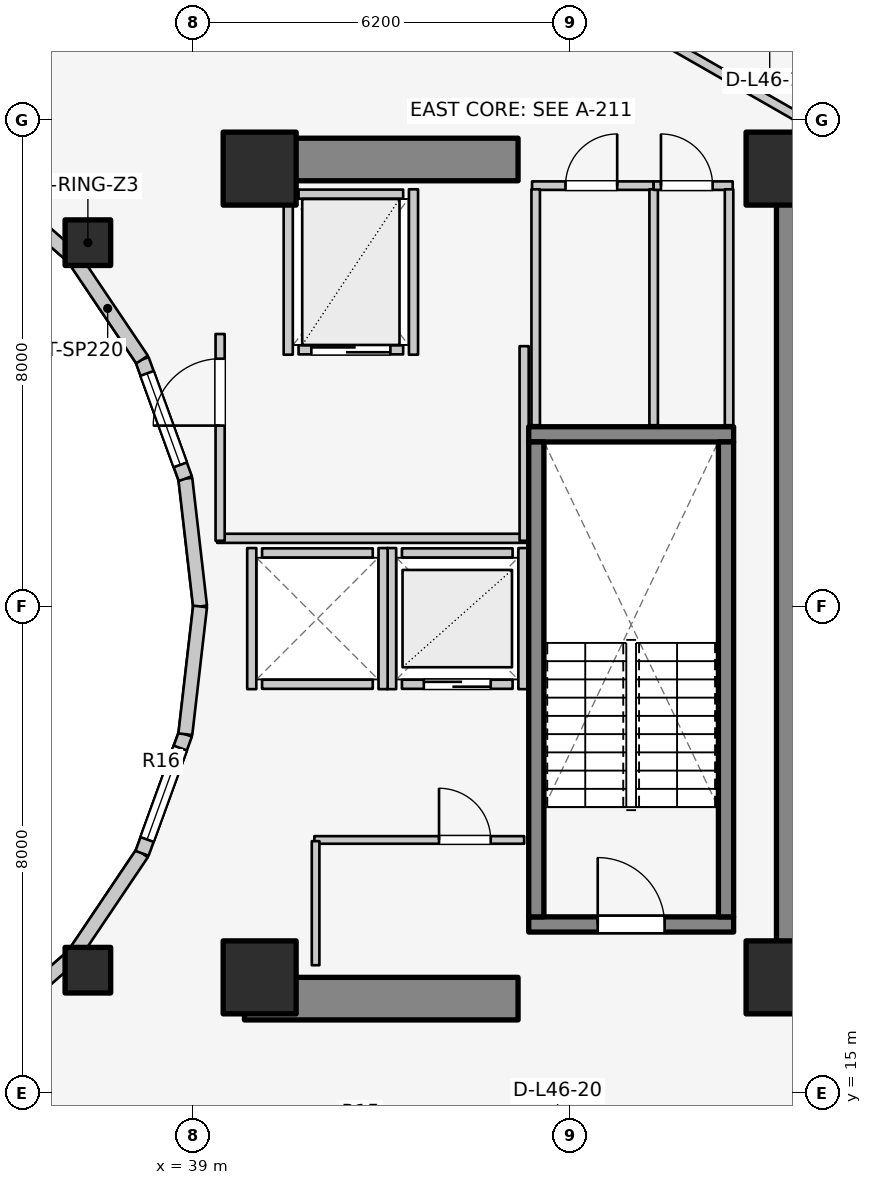
"""IFC4 building model, lengths in metres.
Left out: names, types, materials, properties, quantities, classifications, styles, units other than length and angle.
Written with IfcOpenShell. Run it as: python <this file> out.ifc"""

import sys

from ifc_helpers import new_model, si_unit, direction, frame, frame_2d, origin, origin_2d, place, context, subcontext, project, spatial, rectangle, extrude, element, fill, save


model = new_model("IFC4")
c1 = context("Model", 3, precision=1e-05, world=origin(), true_north=direction((0.0, 1.0)))
c2 = subcontext(c1, "Body", "Model", "MODEL_VIEW")
j1 = project(units=[si_unit("LENGTHUNIT", "METRE"), si_unit("PLANEANGLEUNIT", "RADIAN")], contexts=[c1])
p1 = place(None, origin())
s1 = spatial("IfcSite", under=j1, at=p1, CompositionType="ELEMENT")
p2 = place(p1, origin())
s2 = spatial("IfcBuilding", under=s1, at=p2, CompositionType="ELEMENT")
p3 = place(p2, frame((0.0, 0.0, 152.9)))
s3 = spatial("IfcBuildingStorey", under=s2, at=p3, CompositionType="ELEMENT", Elevation=152.9)
p4 = place(p3, frame((48.95, 17.05, 0.0), z_axis=(0.0, 0.0, 1.0), x_axis=(0.0, 1.0, 0.0)))
e1 = element("IfcWall", 1, at=p4, inside=s3, PredefinedType="SHEAR", context=c2, shape_type="SweptSolid", body=[
    extrude(rectangle(XDim=12.8, YDim=0.7, at=frame_2d((6.4, 0.0))), origin(), (0.0, 0.0, 1.0), 3.1),
])
for number, where, z_axis, x_axis in (
    (2, (39.85, 16.55, 0.0), (0.0, 0.0, 1.0), (1.0, 0.0, 0.0)),
    (3, (39.85, 30.35, 0.0), (0.0, 0.0, 1.0), (1.0, 0.0, 0.0)),
):
    element("IfcWall", number, at=place(p3, frame(where, z_axis=z_axis, x_axis=x_axis)), inside=s3, PredefinedType="SHEAR", context=c2, shape_type="SweptSolid", body=[
        extrude(rectangle(XDim=4.5, YDim=0.7, at=frame_2d((2.25, 0.0))), origin(), (0.0, 0.0, 1.0), 3.1),
    ])
p5 = place(p3, frame((44.525, 17.77, 0.0), z_axis=(0.0, 0.0, 1.0), x_axis=(1.0, 0.0, 0.0)))
e4 = element("IfcWall", 4, at=p5, inside=s3, PredefinedType="SOLIDWALL", context=c2, shape_type="SweptSolid", body=[
    extrude(rectangle(XDim=3.37, YDim=0.25, at=frame_2d((1.685, 0.0))), origin(), (0.0, 0.0, 1.0), 3.1),
])
p6 = place(p5, frame((1.135, 0.0, 0.0)))
e5 = element("IfcOpeningElement", 5, at=p6, cuts=e4, PredefinedType="OPENING", context=c2, shape_type="SweptSolid", body=[
    extrude(rectangle(XDim=1.1, YDim=2.1, at=frame_2d((0.55, 1.05))), frame((0.0, 0.135, 0.0), z_axis=(0.0, -1.0, 0.0), x_axis=(1.0, 0.0, 0.0)), (0.0, 0.0, 1.0), 0.27),
])
p7 = place(p3, frame((44.525, 25.83, 0.0), z_axis=(0.0, 0.0, 1.0), x_axis=(1.0, 0.0, 0.0)))
e6 = element("IfcWall", 6, at=p7, inside=s3, PredefinedType="SOLIDWALL", context=c2, shape_type="SweptSolid", body=[
    extrude(rectangle(XDim=3.37, YDim=0.25, at=frame_2d((1.685, 0.0))), origin(), (0.0, 0.0, 1.0), 3.1),
])
for number, where, z_axis, x_axis in (
    (7, (44.65, 17.895, 0.0), (0.0, 0.0, 1.0), (0.0, 1.0, 0.0)),
    (8, (47.77, 17.895, 0.0), (0.0, 0.0, 1.0), (0.0, 1.0, 0.0)),
):
    element("IfcWall", number, at=place(p3, frame(where, z_axis=z_axis, x_axis=x_axis)), inside=s3, PredefinedType="SOLIDWALL", context=c2, shape_type="SweptSolid", body=[
        extrude(rectangle(XDim=7.81, YDim=0.25, at=frame_2d((3.905, 0.0))), origin(), (0.0, 0.0, 1.0), 3.1),
    ])
for number, where, z_axis, x_axis in (
    (9, (40.1, 16.9, 0.0), (0.0, 0.0, 1.0), (1.0, 0.0, 0.0)),
    (10, (48.7, 16.9, 0.0), (0.0, 0.0, 1.0), (1.0, 0.0, 0.0)),
    (11, (48.7, 30.2, 0.0), (0.0, 0.0, 1.0), (1.0, 0.0, 0.0)),
    (12, (40.1, 30.2, 0.0), (0.0, 0.0, 1.0), (1.0, 0.0, 0.0)),
):
    element("IfcColumn", number, at=place(p3, frame(where, z_axis=z_axis, x_axis=x_axis)), inside=s3, PredefinedType="COLUMN", context=c2, shape_type="SweptSolid", body=[
        extrude(rectangle(XDim=1.2, YDim=1.2, at=origin_2d()), origin(), (0.0, 0.0, 1.0), 3.1),
    ])
for number, where, z_axis, x_axis in (
    (13, (37.275, 28.982, 0.0), (0.0, 0.0, 1.0), (1.0, 0.0, 0.0)),
    (14, (37.275, 17.018, 0.0), (0.0, 0.0, 1.0), (1.0, 0.0, 0.0)),
):
    element("IfcColumn", number, at=place(p3, frame(where, z_axis=z_axis, x_axis=x_axis)), inside=s3, PredefinedType="COLUMN", context=c2, shape_type="SweptSolid", body=[
        extrude(rectangle(XDim=0.75, YDim=0.75, at=origin_2d()), origin(), (0.0, 0.0, 1.0), 3.1),
    ])
p8 = place(p3, frame((39.12, 23.0, 0.0), z_axis=(0.0, 0.0, 1.0), x_axis=(-0.114711713601, 0.993398823617, 0.0)))
e15 = element("IfcWall", 15, at=p8, inside=s3, PredefinedType="STANDARD", context=c2, shape_type="SweptSolid", body=[
    extrude(rectangle(XDim=2.115, YDim=0.23, at=frame_2d((1.058, 0.0))), origin(), (0.0, 0.0, 1.0), 2.84),
])
p9 = place(p3, frame((38.877, 25.102, 0.0), z_axis=(0.0, 0.0, 1.0), x_axis=(-0.341423187295, 0.93990968033, 0.0)))
e16 = element("IfcWall", 16, at=p9, inside=s3, PredefinedType="STANDARD", context=c2, shape_type="SweptSolid", body=[
    extrude(rectangle(XDim=2.084, YDim=0.23, at=frame_2d((1.042, 0.0))), origin(), (0.0, 0.0, 1.0), 2.84),
])
p10 = place(p9, frame((0.242, 0.0, 0.85)))
e17 = element("IfcOpeningElement", 17, at=p10, cuts=e16, PredefinedType="OPENING", context=c2, shape_type="SweptSolid", body=[
    extrude(rectangle(XDim=1.6, YDim=1.65, at=frame_2d((0.8, 0.825))), frame((0.0, 0.125, 0.0), z_axis=(0.0, -1.0, 0.0), x_axis=(1.0, 0.0, 0.0)), (0.0, 0.0, 1.0), 0.25),
])
p11 = place(p3, frame((38.166, 27.06, 0.0), z_axis=(0.0, 0.0, 1.0), x_axis=(-0.558197800898, 0.829707909492, 0.0)))
e18 = element("IfcWall", 18, at=p11, inside=s3, PredefinedType="STANDARD", context=c2, shape_type="SweptSolid", body=[
    extrude(rectangle(XDim=2.027, YDim=0.23, at=frame_2d((1.013, 0.0))), origin(), (0.0, 0.0, 1.0), 2.16),
])
for number, where, z_axis, x_axis in (
    (19, (37.035, 28.742, 0.0), (0.0, 0.0, 1.0), (-0.753, 0.659, 0.0)),
    (20, (35.56, 15.968, 0.0), (0.0, 0.0, 1.0), (0.753, 0.659, 0.0)),
):
    element("IfcWall", number, at=place(p3, frame(where, z_axis=z_axis, x_axis=x_axis)), inside=s3, PredefinedType="STANDARD", context=c2, shape_type="SweptSolid", body=[
        extrude(rectangle(XDim=1.959, YDim=0.23, at=frame_2d((0.98, 0.0))), origin(), (0.0, 0.0, 1.0), 2.16),
    ])
p12 = place(p3, frame((37.035, 17.258, 0.0), z_axis=(0.0, 0.0, 1.0), x_axis=(0.558197800898, 0.829707909492, 0.0)))
e21 = element("IfcWall", 21, at=p12, inside=s3, PredefinedType="STANDARD", context=c2, shape_type="SweptSolid", body=[
    extrude(rectangle(XDim=2.027, YDim=0.23, at=frame_2d((1.013, 0.0))), origin(), (0.0, 0.0, 1.0), 2.16),
])
p13 = place(p3, frame((38.166, 18.94, 0.0), z_axis=(0.0, 0.0, 1.0), x_axis=(0.341423187295, 0.93990968033, 0.0)))
e22 = element("IfcWall", 22, at=p13, inside=s3, PredefinedType="STANDARD", context=c2, shape_type="SweptSolid", body=[
    extrude(rectangle(XDim=2.084, YDim=0.23, at=frame_2d((1.042, 0.0))), origin(), (0.0, 0.0, 1.0), 2.84),
])
p14 = place(p13, frame((0.242, 0.0, 0.85)))
e23 = element("IfcOpeningElement", 23, at=p14, cuts=e22, PredefinedType="OPENING", context=c2, shape_type="SweptSolid", body=[
    extrude(rectangle(XDim=1.6, YDim=1.65, at=frame_2d((0.8, 0.825))), frame((0.0, 0.125, 0.0), z_axis=(0.0, -1.0, 0.0), x_axis=(1.0, 0.0, 0.0)), (0.0, 0.0, 1.0), 0.25),
])
p15 = place(p3, frame((38.877, 20.898, 0.0), z_axis=(0.0, 0.0, 1.0), x_axis=(0.114711713601, 0.993398823617, 0.0)))
e24 = element("IfcWall", 24, at=p15, inside=s3, PredefinedType="STANDARD", context=c2, shape_type="SweptSolid", body=[
    extrude(rectangle(XDim=2.115, YDim=0.23, at=frame_2d((1.058, 0.0))), origin(), (0.0, 0.0, 1.0), 2.84),
])
p16 = place(p3, frame((42.44, 21.72, 0.0), z_axis=(0.0, 0.0, 1.0), x_axis=(1.0, 0.0, 0.0)))
e25 = element("IfcWall", 25, at=p16, inside=s3, PredefinedType="SOLIDWALL", context=c2, shape_type="SweptSolid", body=[
    extrude(rectangle(XDim=1.82, YDim=0.15, at=frame_2d((0.91, 0.0))), origin(), (0.0, 0.0, 1.0), 2.855),
])
p17 = place(p16, frame((0.36, 0.0, 0.0)))
e26 = element("IfcOpeningElement", 26, at=p17, cuts=e25, PredefinedType="OPENING", context=c2, shape_type="SweptSolid", body=[
    extrude(rectangle(XDim=1.1, YDim=2.1, at=frame_2d((0.55, 1.05))), frame((0.0, 0.085, 0.0), z_axis=(0.0, -1.0, 0.0), x_axis=(1.0, 0.0, 0.0)), (0.0, 0.0, 1.0), 0.17),
])
p18 = place(p3, frame((42.44, 23.88, 0.0), z_axis=(0.0, 0.0, 1.0), x_axis=(1.0, 0.0, 0.0)))
e27 = element("IfcWall", 27, at=p18, inside=s3, PredefinedType="SOLIDWALL", context=c2, shape_type="SweptSolid", body=[
    extrude(rectangle(XDim=1.82, YDim=0.15, at=frame_2d((0.91, 0.0))), origin(), (0.0, 0.0, 1.0), 2.855),
])
for number, where, z_axis, x_axis in (
    (28, (42.27, 21.64, 0.0), (0.0, 0.0, 1.0), (0.0, 1.0, 0.0)),
    (29, (44.43, 21.64, 0.0), (0.0, 0.0, 1.0), (0.0, 1.0, 0.0)),
):
    element("IfcWall", number, at=place(p3, frame(where, z_axis=z_axis, x_axis=x_axis)), inside=s3, PredefinedType="SOLIDWALL", context=c2, shape_type="SweptSolid", body=[
        extrude(rectangle(XDim=2.32, YDim=0.15, at=frame_2d((1.16, 0.0))), origin(), (0.0, 0.0, 1.0), 2.855),
    ])
for number, where, z_axis, x_axis in (
    (30, (40.14, 21.72, 0.0), (0.0, 0.0, 1.0), (1.0, 0.0, 0.0)),
    (31, (40.14, 23.88, 0.0), (0.0, 0.0, 1.0), (1.0, 0.0, 0.0)),
):
    element("IfcWall", number, at=place(p3, frame(where, z_axis=z_axis, x_axis=x_axis)), inside=s3, PredefinedType="SOLIDWALL", context=c2, shape_type="SweptSolid", body=[
        extrude(rectangle(XDim=1.82, YDim=0.15, at=frame_2d((0.91, 0.0))), origin(), (0.0, 0.0, 1.0), 2.12),
    ])
p19 = place(p3, frame((39.97, 21.64, 0.0), z_axis=(0.0, 0.0, 1.0), x_axis=(0.0, 1.0, 0.0)))
e32 = element("IfcWall", 32, at=p19, inside=s3, PredefinedType="SOLIDWALL", context=c2, shape_type="SweptSolid", body=[
    extrude(rectangle(XDim=2.32, YDim=0.15, at=frame_2d((1.16, 0.0))), origin(), (0.0, 0.0, 1.0), 2.12),
])
p20 = place(p3, frame((42.13, 21.64, 0.0), z_axis=(0.0, 0.0, 1.0), x_axis=(0.0, 1.0, 0.0)))
e33 = element("IfcWall", 33, at=p20, inside=s3, PredefinedType="SOLIDWALL", context=c2, shape_type="SweptSolid", body=[
    extrude(rectangle(XDim=2.32, YDim=0.15, at=frame_2d((1.16, 0.0))), origin(), (0.0, 0.0, 1.0), 2.855),
])
p21 = place(p3, frame((40.74, 27.22, 0.0), z_axis=(0.0, 0.0, 1.0), x_axis=(1.0, 0.0, 0.0)))
e34 = element("IfcWall", 34, at=p21, inside=s3, PredefinedType="SOLIDWALL", context=c2, shape_type="SweptSolid", body=[
    extrude(rectangle(XDim=1.72, YDim=0.15, at=frame_2d((0.86, 0.0))), origin(), (0.0, 0.0, 1.0), 2.855),
])
p22 = place(p21, frame((0.21, 0.0, 0.0)))
e35 = element("IfcOpeningElement", 35, at=p22, cuts=e34, PredefinedType="OPENING", context=c2, shape_type="SweptSolid", body=[
    extrude(rectangle(XDim=1.3, YDim=2.1, at=frame_2d((0.65, 1.05))), frame((0.0, 0.085, 0.0), z_axis=(0.0, -1.0, 0.0), x_axis=(1.0, 0.0, 0.0)), (0.0, 0.0, 1.0), 0.17),
])
p23 = place(p3, frame((40.74, 29.78, 0.0), z_axis=(0.0, 0.0, 1.0), x_axis=(1.0, 0.0, 0.0)))
e36 = element("IfcWall", 36, at=p23, inside=s3, PredefinedType="SOLIDWALL", context=c2, shape_type="SweptSolid", body=[
    extrude(rectangle(XDim=1.72, YDim=0.15, at=frame_2d((0.86, 0.0))), origin(), (0.0, 0.0, 1.0), 2.855),
])
for number, where, z_axis, x_axis in (
    (37, (40.57, 27.14, 0.0), (0.0, 0.0, 1.0), (0.0, 1.0, 0.0)),
    (38, (42.63, 27.14, 0.0), (0.0, 0.0, 1.0), (0.0, 1.0, 0.0)),
):
    element("IfcWall", number, at=place(p3, frame(where, z_axis=z_axis, x_axis=x_axis)), inside=s3, PredefinedType="SOLIDWALL", context=c2, shape_type="SweptSolid", body=[
        extrude(rectangle(XDim=2.72, YDim=0.15, at=frame_2d((1.36, 0.0))), origin(), (0.0, 0.0, 1.0), 2.855),
    ])
p24 = place(p3, frame((39.4, 24.12, 0.0), z_axis=(0.0, 0.0, 1.0), x_axis=(1.0, 0.0, 0.0)))
e39 = element("IfcWall", 39, at=p24, inside=s3, PredefinedType="PARTITIONING", context=c2, shape_type="SweptSolid", body=[
    extrude(rectangle(XDim=5.08, YDim=0.15, at=frame_2d((2.54, 0.0))), origin(), (0.0, 0.0, 1.0), 2.12),
])
p25 = place(p3, frame((44.45, 24.08, 0.0), z_axis=(0.0, 0.0, 1.0), x_axis=(0.0, 1.0, 0.0)))
e40 = element("IfcWall", 40, at=p25, inside=s3, PredefinedType="PARTITIONING", context=c2, shape_type="SweptSolid", body=[
    extrude(rectangle(XDim=3.2, YDim=0.15, at=frame_2d((1.6, 0.0))), origin(), (0.0, 0.0, 1.0), 2.855),
])
p26 = place(p3, frame((39.45, 24.08, 0.0), z_axis=(0.0, 0.0, 1.0), x_axis=(0.0, 1.0, 0.0)))
e41 = element("IfcWall", 41, at=p26, inside=s3, PredefinedType="PARTITIONING", context=c2, shape_type="SweptSolid", body=[
    extrude(rectangle(XDim=3.4, YDim=0.15, at=frame_2d((1.7, 0.0))), origin(), (0.0, 0.0, 1.0), 2.855),
])
p27 = place(p26, frame((1.894, 0.0, 0.0)))
e42 = element("IfcOpeningElement", 42, at=p27, cuts=e41, PredefinedType="OPENING", context=c2, shape_type="SweptSolid", body=[
    extrude(rectangle(XDim=1.1, YDim=2.1, at=frame_2d((0.55, 1.05))), frame((0.0, 0.085, 0.0), z_axis=(0.0, -1.0, 0.0), x_axis=(1.0, 0.0, 0.0)), (0.0, 0.0, 1.0), 0.17),
])
p28 = place(p3, frame((41.0, 19.16, 0.0), z_axis=(0.0, 0.0, 1.0), x_axis=(1.0, 0.0, 0.0)))
e43 = element("IfcWall", 43, at=p28, inside=s3, PredefinedType="PARTITIONING", context=c2, shape_type="SweptSolid", body=[
    extrude(rectangle(XDim=3.45, YDim=0.125, at=frame_2d((1.725, 0.0))), origin(), (0.0, 0.0, 1.0), 2.12),
])
p29 = place(p28, frame((2.05, 0.0, 0.0)))
e44 = element("IfcOpeningElement", 44, at=p29, cuts=e43, PredefinedType="OPENING", context=c2, shape_type="SweptSolid", body=[
    extrude(rectangle(XDim=0.85, YDim=2.05, at=frame_2d((0.425, 1.025))), frame((0.0, 0.073, 0.0), z_axis=(0.0, -1.0, 0.0), x_axis=(1.0, 0.0, 0.0)), (0.0, 0.0, 1.0), 0.145),
])
p30 = place(p3, frame((41.02, 17.1, 0.0), z_axis=(0.0, 0.0, 1.0), x_axis=(0.0, 1.0, 0.0)))
e45 = element("IfcWall", 45, at=p30, inside=s3, PredefinedType="PARTITIONING", context=c2, shape_type="SweptSolid", body=[
    extrude(rectangle(XDim=2.04, YDim=0.125, at=frame_2d((1.02, 0.0))), origin(), (0.0, 0.0, 1.0), 2.855),
])
p31 = place(p3, frame((44.58, 29.92, 0.0), z_axis=(0.0, 0.0, 1.0), x_axis=(1.0, 0.0, 0.0)))
e46 = element("IfcWall", 46, at=p31, inside=s3, PredefinedType="PLUMBINGWALL", context=c2, shape_type="SweptSolid", body=[
    extrude(rectangle(XDim=2.0, YDim=0.14, at=frame_2d((1.0, 0.0))), origin(), (0.0, 0.0, 1.0), 2.855),
])
p32 = place(p31, frame((0.55, 0.0, 0.0)))
e47 = element("IfcOpeningElement", 47, at=p32, cuts=e46, PredefinedType="OPENING", context=c2, shape_type="SweptSolid", body=[
    extrude(rectangle(XDim=0.85, YDim=2.05, at=frame_2d((0.425, 1.025))), frame((0.0, 0.08, 0.0), z_axis=(0.0, -1.0, 0.0), x_axis=(1.0, 0.0, 0.0)), (0.0, 0.0, 1.0), 0.16),
])
for number, where, z_axis, x_axis in (
    (48, (44.64, 25.98, 0.0), (0.0, 0.0, 1.0), (0.0, 1.0, 0.0)),
    (49, (46.58, 25.98, 0.0), (0.0, 0.0, 1.0), (0.0, 1.0, 0.0)),
):
    element("IfcWall", number, at=place(p3, frame(where, z_axis=z_axis, x_axis=x_axis)), inside=s3, PredefinedType="PLUMBINGWALL", context=c2, shape_type="SweptSolid", body=[
        extrude(rectangle(XDim=3.88, YDim=0.14, at=frame_2d((1.94, 0.0))), origin(), (0.0, 0.0, 1.0), 2.855),
    ])
p33 = place(p3, frame((46.58, 29.92, 0.0), z_axis=(0.0, 0.0, 1.0), x_axis=(1.0, 0.0, 0.0)))
e50 = element("IfcWall", 50, at=p33, inside=s3, PredefinedType="PLUMBINGWALL", context=c2, shape_type="SweptSolid", body=[
    extrude(rectangle(XDim=1.3, YDim=0.14, at=frame_2d((0.65, 0.0))), origin(), (0.0, 0.0, 1.0), 2.855),
])
p34 = place(p33, frame((0.12, 0.0, 0.0)))
e51 = element("IfcOpeningElement", 51, at=p34, cuts=e50, PredefinedType="OPENING", context=c2, shape_type="SweptSolid", body=[
    extrude(rectangle(XDim=0.85, YDim=2.05, at=frame_2d((0.425, 1.025))), frame((0.0, 0.08, 0.0), z_axis=(0.0, -1.0, 0.0), x_axis=(1.0, 0.0, 0.0)), (0.0, 0.0, 1.0), 0.16),
])
p35 = place(p3, frame((47.82, 25.98, 0.0), z_axis=(0.0, 0.0, 1.0), x_axis=(0.0, 1.0, 0.0)))
e52 = element("IfcWall", 52, at=p35, inside=s3, PredefinedType="PLUMBINGWALL", context=c2, shape_type="SweptSolid", body=[
    extrude(rectangle(XDim=3.88, YDim=0.14, at=frame_2d((1.94, 0.0))), origin(), (0.0, 0.0, 1.0), 2.855),
])
p36 = place(p3, frame((46.757, 32.305, 0.0), z_axis=(0.0, 0.0, 1.0), x_axis=(0.867991349648, -0.496579315857, 0.0)))
e53 = element("IfcWall", 53, at=p36, inside=s3, PredefinedType="PARTITIONING", context=c2, shape_type="SweptSolid", body=[
    extrude(rectangle(XDim=2.567, YDim=0.15, at=frame_2d((1.283, 0.0))), origin(), (0.0, 0.0, 1.0), 2.22),
])
p37 = place(p3, frame((35.55, 15.985, 0.0), z_axis=(0.0, 0.0, 1.0), x_axis=(0.523587550846, -0.851971875474, 0.0)))
e54 = element("IfcWall", 54, at=p37, inside=s3, PredefinedType="PARTITIONING", context=c2, shape_type="SweptSolid", body=[
    extrude(rectangle(XDim=3.153, YDim=0.125, at=frame_2d((1.577, 0.0))), origin(), (0.0, 0.0, 1.0), 2.299),
])
p38 = place(p10, origin())
e55 = element("IfcWindow", 55, at=p38, inside=s3, PartitioningType="SINGLE_PANEL", PredefinedType="WINDOW", context=c2, shape_type="SweptSolid", body=[
    extrude(rectangle(XDim=1.6, YDim=1.65, at=frame_2d((0.8, 0.825))), frame((0.0, 0.03, 0.0), z_axis=(0.0, -1.0, 0.0), x_axis=(1.0, 0.0, 0.0)), (0.0, 0.0, 1.0), 0.06),
])
fill(e17, e55)
p39 = place(p14, origin())
e56 = element("IfcWindow", 56, at=p39, inside=s3, PartitioningType="SINGLE_PANEL", PredefinedType="WINDOW", context=c2, shape_type="SweptSolid", body=[
    extrude(rectangle(XDim=1.6, YDim=1.65, at=frame_2d((0.8, 0.825))), frame((0.0, 0.03, 0.0), z_axis=(0.0, -1.0, 0.0), x_axis=(1.0, 0.0, 0.0)), (0.0, 0.0, 1.0), 0.06),
])
fill(e23, e56)
p40 = place(p6, origin())
e57 = element("IfcDoor", 57, at=p40, inside=s3, OperationType="SINGLE_SWING_LEFT", PredefinedType="DOOR", context=c2, shape_type="SweptSolid", body=[
    extrude(rectangle(XDim=1.1, YDim=2.1, at=frame_2d((0.55, 1.05))), frame((0.0, 0.025, 0.0), z_axis=(0.0, -1.0, 0.0), x_axis=(1.0, 0.0, 0.0)), (0.0, 0.0, 1.0), 0.05),
])
fill(e5, e57)
p41 = place(p17, origin())
e58 = element("IfcDoor", 58, at=p41, inside=s3, OperationType="DOUBLE_DOOR_SLIDING", PredefinedType="DOOR", context=c2, shape_type="SweptSolid", body=[
    extrude(rectangle(XDim=1.1, YDim=2.1, at=frame_2d((0.55, 1.05))), frame((0.0, 0.025, 0.0), z_axis=(0.0, -1.0, 0.0), x_axis=(1.0, 0.0, 0.0)), (0.0, 0.0, 1.0), 0.05),
])
fill(e26, e58)
p42 = place(p22, origin())
e59 = element("IfcDoor", 59, at=p42, inside=s3, OperationType="DOUBLE_DOOR_SLIDING", PredefinedType="DOOR", context=c2, shape_type="SweptSolid", body=[
    extrude(rectangle(XDim=1.3, YDim=2.1, at=frame_2d((0.65, 1.05))), frame((0.0, 0.025, 0.0), z_axis=(0.0, -1.0, 0.0), x_axis=(1.0, 0.0, 0.0)), (0.0, 0.0, 1.0), 0.05),
])
fill(e35, e59)
p43 = place(p27, origin())
e60 = element("IfcDoor", 60, at=p43, inside=s3, OperationType="SINGLE_SWING_LEFT", PredefinedType="DOOR", context=c2, shape_type="SweptSolid", body=[
    extrude(rectangle(XDim=1.1, YDim=2.1, at=frame_2d((0.55, 1.05))), frame((0.0, 0.025, 0.0), z_axis=(0.0, -1.0, 0.0), x_axis=(1.0, 0.0, 0.0)), (0.0, 0.0, 1.0), 0.05),
])
fill(e42, e60)
p44 = place(p29, origin())
e61 = element("IfcDoor", 61, at=p44, inside=s3, OperationType="SINGLE_SWING_LEFT", PredefinedType="DOOR", context=c2, shape_type="SweptSolid", body=[
    extrude(rectangle(XDim=0.85, YDim=2.05, at=frame_2d((0.425, 1.025))), frame((0.0, 0.025, 0.0), z_axis=(0.0, -1.0, 0.0), x_axis=(1.0, 0.0, 0.0)), (0.0, 0.0, 1.0), 0.05),
])
fill(e44, e61)
p45 = place(p32, origin())
e62 = element("IfcDoor", 62, at=p45, inside=s3, OperationType="SINGLE_SWING_RIGHT", PredefinedType="DOOR", context=c2, shape_type="SweptSolid", body=[
    extrude(rectangle(XDim=0.85, YDim=2.05, at=frame_2d((0.425, 1.025))), frame((0.0, 0.025, 0.0), z_axis=(0.0, -1.0, 0.0), x_axis=(1.0, 0.0, 0.0)), (0.0, 0.0, 1.0), 0.05),
])
fill(e47, e62)
p46 = place(p34, origin())
e63 = element("IfcDoor", 63, at=p46, inside=s3, OperationType="SINGLE_SWING_LEFT", PredefinedType="DOOR", context=c2, shape_type="SweptSolid", body=[
    extrude(rectangle(XDim=0.85, YDim=2.05, at=frame_2d((0.425, 1.025))), frame((0.0, 0.025, 0.0), z_axis=(0.0, -1.0, 0.0), x_axis=(1.0, 0.0, 0.0)), (0.0, 0.0, 1.0), 0.05),
])
fill(e51, e63)
save(model, sys.argv[1])
